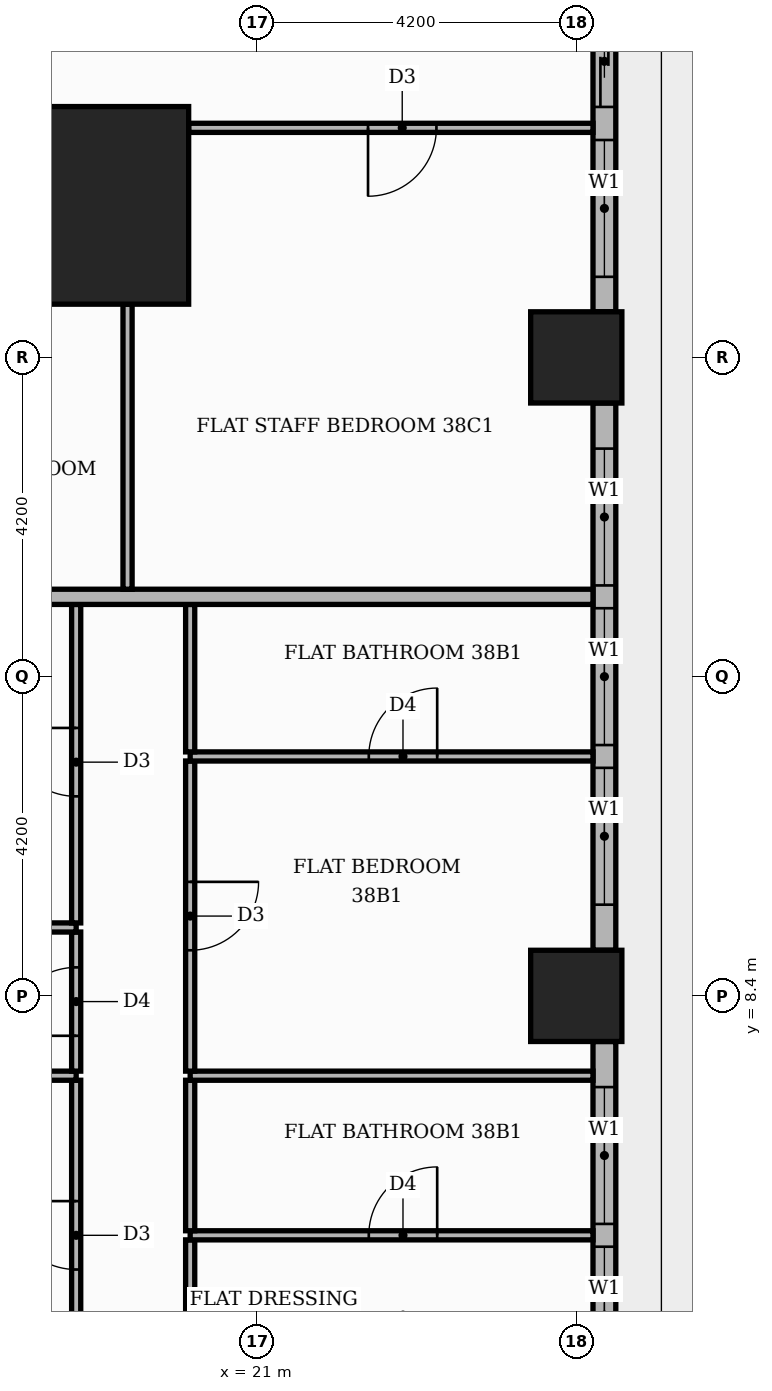
"""IFC4 building model, lengths in metres.
Left out: names, types, materials, properties, quantities, classifications, styles, units other than length and angle.
Written with IfcOpenShell. Run it as: python <this file> out.ifc"""

import sys

from ifc_helpers import new_model, si_unit, direction, frame, frame_2d, origin, origin_2d, place, context, subcontext, project, spatial, rectangle, extrude, element, fill, save


model = new_model("IFC4")
c1 = context("Model", 3, precision=1e-05, world=origin(), true_north=direction((0.0, 1.0)))
c2 = subcontext(c1, "Body", "Model", "MODEL_VIEW")
j1 = project(units=[si_unit("LENGTHUNIT", "METRE"), si_unit("PLANEANGLEUNIT", "RADIAN")], contexts=[c1])
p1 = place(None, origin())
s1 = spatial("IfcSite", under=j1, at=p1, CompositionType="ELEMENT")
p2 = place(p1, origin())
s2 = spatial("IfcBuilding", under=s1, at=p2, CompositionType="ELEMENT")
p3 = place(p2, frame((0.0, 0.0, 161.1)))
s3 = spatial("IfcBuildingStorey", under=s2, at=p3, CompositionType="ELEMENT", Elevation=161.1)
p4 = place(p3, frame((18.8, 18.8, 0.0), z_axis=(0.0, 0.0, 1.0), x_axis=(1.0, 0.0, 0.0)))
e1 = element("IfcColumn", 1, at=p4, inside=s3, PredefinedType="COLUMN", context=c2, shape_type="SweptSolid", body=[
    extrude(rectangle(XDim=2.6, YDim=2.6, at=origin_2d()), origin(), (0.0, 0.0, 1.0), 3.9),
])
for number, where, z_axis, x_axis in (
    (2, (25.2, 8.4, 0.0), (0.0, 0.0, 1.0), (1.0, 0.0, 0.0)),
    (3, (25.2, 16.8, 0.0), (0.0, 0.0, 1.0), (1.0, 0.0, 0.0)),
):
    element("IfcColumn", number, at=place(p3, frame(where, z_axis=z_axis, x_axis=x_axis)), inside=s3, PredefinedType="COLUMN", context=c2, shape_type="SweptSolid", body=[
        extrude(rectangle(XDim=1.2, YDim=1.2, at=origin_2d()), origin(), (0.0, 0.0, 1.0), 3.9),
    ])
p5 = place(p3, frame((25.57, 0.6, 0.0), z_axis=(0.0, 0.0, 1.0), x_axis=(0.0, 1.0, 0.0)))
e4 = element("IfcWall", 4, at=p5, inside=s3, PredefinedType="STANDARD", context=c2, shape_type="SweptSolid", body=[
    extrude(rectangle(XDim=7.2, YDim=0.3, at=frame_2d((3.6, 0.0))), origin(), (0.0, 0.0, 1.0), 3.48),
])
p6 = place(p5, frame((0.6, 0.0, 0.0)))
e5 = element("IfcOpeningElement", 5, at=p6, cuts=e4, PredefinedType="OPENING", context=c2, shape_type="SweptSolid", body=[
    extrude(rectangle(XDim=1.8, YDim=2.4, at=frame_2d((0.9, 1.2))), frame((0.0, 0.16, 0.0), z_axis=(0.0, -1.0, 0.0), x_axis=(1.0, 0.0, 0.0)), (0.0, 0.0, 1.0), 0.32),
])
p7 = place(p5, frame((2.7, 0.0, 0.9)))
e6 = element("IfcOpeningElement", 6, at=p7, cuts=e4, PredefinedType="OPENING", context=c2, shape_type="SweptSolid", body=[
    extrude(rectangle(XDim=1.8, YDim=2.1, at=frame_2d((0.9, 1.05))), frame((0.0, 0.16, 0.0), z_axis=(0.0, -1.0, 0.0), x_axis=(1.0, 0.0, 0.0)), (0.0, 0.0, 1.0), 0.32),
])
p8 = place(p5, frame((4.8, 0.0, 0.9)))
e7 = element("IfcOpeningElement", 7, at=p8, cuts=e4, PredefinedType="OPENING", context=c2, shape_type="SweptSolid", body=[
    extrude(rectangle(XDim=1.8, YDim=2.1, at=frame_2d((0.9, 1.05))), frame((0.0, 0.16, 0.0), z_axis=(0.0, -1.0, 0.0), x_axis=(1.0, 0.0, 0.0)), (0.0, 0.0, 1.0), 0.32),
])
p9 = place(p3, frame((25.57, 9.0, 0.0), z_axis=(0.0, 0.0, 1.0), x_axis=(0.0, 1.0, 0.0)))
e8 = element("IfcWall", 8, at=p9, inside=s3, PredefinedType="STANDARD", context=c2, shape_type="SweptSolid", body=[
    extrude(rectangle(XDim=7.2, YDim=0.3, at=frame_2d((3.6, 0.0))), origin(), (0.0, 0.0, 1.0), 3.48),
])
p10 = place(p9, frame((0.6, 0.0, 0.9)))
e9 = element("IfcOpeningElement", 9, at=p10, cuts=e8, PredefinedType="OPENING", context=c2, shape_type="SweptSolid", body=[
    extrude(rectangle(XDim=1.8, YDim=2.1, at=frame_2d((0.9, 1.05))), frame((0.0, 0.16, 0.0), z_axis=(0.0, -1.0, 0.0), x_axis=(1.0, 0.0, 0.0)), (0.0, 0.0, 1.0), 0.32),
])
p11 = place(p9, frame((2.7, 0.0, 0.9)))
e10 = element("IfcOpeningElement", 10, at=p11, cuts=e8, PredefinedType="OPENING", context=c2, shape_type="SweptSolid", body=[
    extrude(rectangle(XDim=1.8, YDim=2.1, at=frame_2d((0.9, 1.05))), frame((0.0, 0.16, 0.0), z_axis=(0.0, -1.0, 0.0), x_axis=(1.0, 0.0, 0.0)), (0.0, 0.0, 1.0), 0.32),
])
p12 = place(p9, frame((4.8, 0.0, 0.9)))
e11 = element("IfcOpeningElement", 11, at=p12, cuts=e8, PredefinedType="OPENING", context=c2, shape_type="SweptSolid", body=[
    extrude(rectangle(XDim=1.8, YDim=2.1, at=frame_2d((0.9, 1.05))), frame((0.0, 0.16, 0.0), z_axis=(0.0, -1.0, 0.0), x_axis=(1.0, 0.0, 0.0)), (0.0, 0.0, 1.0), 0.32),
])
p13 = place(p3, frame((25.57, 17.4, 0.0), z_axis=(0.0, 0.0, 1.0), x_axis=(0.0, 1.0, 0.0)))
e12 = element("IfcWall", 12, at=p13, inside=s3, PredefinedType="STANDARD", context=c2, shape_type="SweptSolid", body=[
    extrude(rectangle(XDim=4.32, YDim=0.3, at=frame_2d((2.16, 0.0))), origin(), (0.0, 0.0, 1.0), 3.48),
])
p14 = place(p13, frame((2.695, 0.0, 0.0)))
e13 = element("IfcOpeningElement", 13, at=p14, cuts=e12, PredefinedType="OPENING", context=c2, shape_type="SweptSolid", body=[
    extrude(rectangle(XDim=1.2, YDim=2.4, at=frame_2d((0.6, 1.2))), frame((0.0, 0.16, 0.0), z_axis=(0.0, -1.0, 0.0), x_axis=(1.0, 0.0, 0.0)), (0.0, 0.0, 1.0), 0.32),
])
p15 = place(p13, frame((0.46, 0.0, 0.9)))
e14 = element("IfcOpeningElement", 14, at=p15, cuts=e12, PredefinedType="OPENING", context=c2, shape_type="SweptSolid", body=[
    extrude(rectangle(XDim=1.8, YDim=2.1, at=frame_2d((0.9, 1.05))), frame((0.0, 0.16, 0.0), z_axis=(0.0, -1.0, 0.0), x_axis=(1.0, 0.0, 0.0)), (0.0, 0.0, 1.0), 0.32),
])
p16 = place(p3, frame((18.62, 3.21, 0.0), z_axis=(0.0, 0.0, 1.0), x_axis=(0.0, 1.0, 0.0)))
e15 = element("IfcWall", 15, at=p16, inside=s3, PredefinedType="PARTITIONING", context=c2, shape_type="SweptSolid", body=[
    extrude(rectangle(XDim=4.08, YDim=0.12, at=frame_2d((2.04, 0.0))), origin(), (0.0, 0.0, 1.0), 3.48),
])
p17 = place(p16, frame((1.59, 0.0, 0.0)))
e16 = element("IfcOpeningElement", 16, at=p17, cuts=e15, PredefinedType="OPENING", context=c2, shape_type="SweptSolid", body=[
    extrude(rectangle(XDim=0.9, YDim=2.1, at=frame_2d((0.45, 1.05))), frame((0.0, 0.07, 0.0), z_axis=(0.0, -1.0, 0.0), x_axis=(1.0, 0.0, 0.0)), (0.0, 0.0, 1.0), 0.14),
])
p18 = place(p3, frame((20.12, 3.21, 0.0), z_axis=(0.0, 0.0, 1.0), x_axis=(0.0, 1.0, 0.0)))
e17 = element("IfcWall", 17, at=p18, inside=s3, PredefinedType="PARTITIONING", context=c2, shape_type="SweptSolid", body=[
    extrude(rectangle(XDim=1.98, YDim=0.12, at=frame_2d((0.99, 0.0))), origin(), (0.0, 0.0, 1.0), 3.48),
])
p19 = place(p3, frame((20.12, 5.25, 0.0), z_axis=(0.0, 0.0, 1.0), x_axis=(1.0, 0.0, 0.0)))
e18 = element("IfcWall", 18, at=p19, inside=s3, PredefinedType="PARTITIONING", context=c2, shape_type="SweptSolid", body=[
    extrude(rectangle(XDim=5.3, YDim=0.12, at=frame_2d((2.65, 0.0))), origin(), (0.0, 0.0, 1.0), 3.48),
])
p20 = place(p19, frame((2.35, 0.0, 0.0)))
e19 = element("IfcOpeningElement", 19, at=p20, cuts=e18, PredefinedType="OPENING", context=c2, shape_type="SweptSolid", body=[
    extrude(rectangle(XDim=0.9, YDim=2.1, at=frame_2d((0.45, 1.05))), frame((0.0, 0.07, 0.0), z_axis=(0.0, -1.0, 0.0), x_axis=(1.0, 0.0, 0.0)), (0.0, 0.0, 1.0), 0.14),
])
p21 = place(p3, frame((20.12, 5.31, 0.0), z_axis=(0.0, 0.0, 1.0), x_axis=(0.0, 1.0, 0.0)))
e20 = element("IfcWall", 20, at=p21, inside=s3, PredefinedType="PARTITIONING", context=c2, shape_type="SweptSolid", body=[
    extrude(rectangle(XDim=1.98, YDim=0.12, at=frame_2d((0.99, 0.0))), origin(), (0.0, 0.0, 1.0), 3.48),
])
p22 = place(p3, frame((11.0, 7.35, 0.0), z_axis=(0.0, 0.0, 1.0), x_axis=(1.0, 0.0, 0.0)))
e21 = element("IfcWall", 21, at=p22, inside=s3, PredefinedType="PARTITIONING", context=c2, shape_type="SweptSolid", body=[
    extrude(rectangle(XDim=7.62, YDim=0.12, at=frame_2d((3.81, 0.0))), origin(), (0.0, 0.0, 1.0), 3.48),
])
p23 = place(p3, frame((20.12, 7.35, 0.0), z_axis=(0.0, 0.0, 1.0), x_axis=(1.0, 0.0, 0.0)))
e22 = element("IfcWall", 22, at=p23, inside=s3, PredefinedType="PARTITIONING", context=c2, shape_type="SweptSolid", body=[
    extrude(rectangle(XDim=5.3, YDim=0.12, at=frame_2d((2.65, 0.0))), origin(), (0.0, 0.0, 1.0), 3.48),
])
p24 = place(p3, frame((18.62, 7.41, 0.0), z_axis=(0.0, 0.0, 1.0), x_axis=(0.0, 1.0, 0.0)))
e23 = element("IfcWall", 23, at=p24, inside=s3, PredefinedType="PARTITIONING", context=c2, shape_type="SweptSolid", body=[
    extrude(rectangle(XDim=1.83, YDim=0.12, at=frame_2d((0.915, 0.0))), origin(), (0.0, 0.0, 1.0), 3.48),
])
p25 = place(p24, frame((0.465, 0.0, 0.0)))
e24 = element("IfcOpeningElement", 24, at=p25, cuts=e23, PredefinedType="OPENING", context=c2, shape_type="SweptSolid", body=[
    extrude(rectangle(XDim=0.9, YDim=2.1, at=frame_2d((0.45, 1.05))), frame((0.0, 0.07, 0.0), z_axis=(0.0, -1.0, 0.0), x_axis=(1.0, 0.0, 0.0)), (0.0, 0.0, 1.0), 0.14),
])
p26 = place(p3, frame((20.12, 7.41, 0.0), z_axis=(0.0, 0.0, 1.0), x_axis=(0.0, 1.0, 0.0)))
e25 = element("IfcWall", 25, at=p26, inside=s3, PredefinedType="PARTITIONING", context=c2, shape_type="SweptSolid", body=[
    extrude(rectangle(XDim=4.08, YDim=0.12, at=frame_2d((2.04, 0.0))), origin(), (0.0, 0.0, 1.0), 3.48),
])
p27 = place(p26, frame((1.59, 0.0, 0.0)))
e26 = element("IfcOpeningElement", 26, at=p27, cuts=e25, PredefinedType="OPENING", context=c2, shape_type="SweptSolid", body=[
    extrude(rectangle(XDim=0.9, YDim=2.1, at=frame_2d((0.45, 1.05))), frame((0.0, 0.07, 0.0), z_axis=(0.0, -1.0, 0.0), x_axis=(1.0, 0.0, 0.0)), (0.0, 0.0, 1.0), 0.14),
])
p28 = place(p3, frame((11.0, 9.3, 0.0), z_axis=(0.0, 0.0, 1.0), x_axis=(1.0, 0.0, 0.0)))
e27 = element("IfcWall", 27, at=p28, inside=s3, PredefinedType="PARTITIONING", context=c2, shape_type="SweptSolid", body=[
    extrude(rectangle(XDim=7.62, YDim=0.12, at=frame_2d((3.81, 0.0))), origin(), (0.0, 0.0, 1.0), 3.48),
])
p29 = place(p3, frame((18.62, 9.36, 0.0), z_axis=(0.0, 0.0, 1.0), x_axis=(0.0, 1.0, 0.0)))
e28 = element("IfcWall", 28, at=p29, inside=s3, PredefinedType="PARTITIONING", context=c2, shape_type="SweptSolid", body=[
    extrude(rectangle(XDim=4.19, YDim=0.12, at=frame_2d((2.095, 0.0))), origin(), (0.0, 0.0, 1.0), 3.48),
])
p30 = place(p29, frame((1.665, 0.0, 0.0)))
e29 = element("IfcOpeningElement", 29, at=p30, cuts=e28, PredefinedType="OPENING", context=c2, shape_type="SweptSolid", body=[
    extrude(rectangle(XDim=0.9, YDim=2.1, at=frame_2d((0.45, 1.05))), frame((0.0, 0.07, 0.0), z_axis=(0.0, -1.0, 0.0), x_axis=(1.0, 0.0, 0.0)), (0.0, 0.0, 1.0), 0.14),
])
p31 = place(p3, frame((20.12, 11.55, 0.0), z_axis=(0.0, 0.0, 1.0), x_axis=(1.0, 0.0, 0.0)))
e30 = element("IfcWall", 30, at=p31, inside=s3, PredefinedType="PARTITIONING", context=c2, shape_type="SweptSolid", body=[
    extrude(rectangle(XDim=5.3, YDim=0.12, at=frame_2d((2.65, 0.0))), origin(), (0.0, 0.0, 1.0), 3.48),
])
p32 = place(p31, frame((2.35, 0.0, 0.0)))
e31 = element("IfcOpeningElement", 31, at=p32, cuts=e30, PredefinedType="OPENING", context=c2, shape_type="SweptSolid", body=[
    extrude(rectangle(XDim=0.9, YDim=2.1, at=frame_2d((0.45, 1.05))), frame((0.0, 0.07, 0.0), z_axis=(0.0, -1.0, 0.0), x_axis=(1.0, 0.0, 0.0)), (0.0, 0.0, 1.0), 0.14),
])
p33 = place(p3, frame((20.12, 11.61, 0.0), z_axis=(0.0, 0.0, 1.0), x_axis=(0.0, 1.0, 0.0)))
e32 = element("IfcWall", 32, at=p33, inside=s3, PredefinedType="PARTITIONING", context=c2, shape_type="SweptSolid", body=[
    extrude(rectangle(XDim=1.94, YDim=0.12, at=frame_2d((0.97, 0.0))), origin(), (0.0, 0.0, 1.0), 3.48),
])
p34 = place(p3, frame((-13.65, 13.65, 0.0), z_axis=(0.0, 0.0, 1.0), x_axis=(1.0, 0.0, 0.0)))
e33 = element("IfcWall", 33, at=p34, inside=s3, PredefinedType="PARTITIONING", context=c2, shape_type="SweptSolid", body=[
    extrude(rectangle(XDim=39.07, YDim=0.2, at=frame_2d((19.535, 0.0))), origin(), (0.0, 0.0, 1.0), 3.48),
])
p35 = place(p34, frame((24.65, 0.0, 0.0)))
e34 = element("IfcOpeningElement", 34, at=p35, cuts=e33, PredefinedType="OPENING", context=c2, shape_type="SweptSolid", body=[
    extrude(rectangle(XDim=1.1, YDim=2.4, at=frame_2d((0.55, 1.2))), frame((0.0, 0.11, 0.0), z_axis=(0.0, -1.0, 0.0), x_axis=(1.0, 0.0, 0.0)), (0.0, 0.0, 1.0), 0.22),
])
p36 = place(p34, frame((12.05, 0.0, 0.0)))
e35 = element("IfcOpeningElement", 35, at=p36, cuts=e33, PredefinedType="OPENING", context=c2, shape_type="SweptSolid", body=[
    extrude(rectangle(XDim=1.1, YDim=2.4, at=frame_2d((0.55, 1.2))), frame((0.0, 0.11, 0.0), z_axis=(0.0, -1.0, 0.0), x_axis=(1.0, 0.0, 0.0)), (0.0, 0.0, 1.0), 0.22),
])
p37 = place(p3, frame((19.296, 13.75, 0.0), z_axis=(0.0, 0.0, 1.0), x_axis=(0.0, 1.0, 0.0)))
e36 = element("IfcWall", 36, at=p37, inside=s3, PredefinedType="PARTITIONING", context=c2, shape_type="SweptSolid", body=[
    extrude(rectangle(XDim=3.75, YDim=0.12, at=frame_2d((1.875, 0.0))), origin(), (0.0, 0.0, 1.0), 3.48),
])
p38 = place(p3, frame((20.1, 19.82, 0.0), z_axis=(0.0, 0.0, 1.0), x_axis=(1.0, 0.0, 0.0)))
e37 = element("IfcWall", 37, at=p38, inside=s3, PredefinedType="PARTITIONING", context=c2, shape_type="SweptSolid", body=[
    extrude(rectangle(XDim=5.32, YDim=0.12, at=frame_2d((2.66, 0.0))), origin(), (0.0, 0.0, 1.0), 3.48),
])
p39 = place(p38, frame((2.36, 0.0, 0.0)))
e38 = element("IfcOpeningElement", 38, at=p39, cuts=e37, PredefinedType="OPENING", context=c2, shape_type="SweptSolid", body=[
    extrude(rectangle(XDim=0.9, YDim=2.1, at=frame_2d((0.45, 1.05))), frame((0.0, 0.07, 0.0), z_axis=(0.0, -1.0, 0.0), x_axis=(1.0, 0.0, 0.0)), (0.0, 0.0, 1.0), 0.14),
])
p40 = place(p7, origin())
e39 = element("IfcWindow", 39, at=p40, inside=s3, PartitioningType="SINGLE_PANEL", PredefinedType="WINDOW", context=c2, shape_type="SweptSolid", body=[
    extrude(rectangle(XDim=1.8, YDim=2.1, at=frame_2d((0.9, 1.05))), frame((0.0, 0.03, 0.0), z_axis=(0.0, -1.0, 0.0), x_axis=(1.0, 0.0, 0.0)), (0.0, 0.0, 1.0), 0.06),
])
fill(e6, e39)
p41 = place(p8, origin())
e40 = element("IfcWindow", 40, at=p41, inside=s3, PartitioningType="SINGLE_PANEL", PredefinedType="WINDOW", context=c2, shape_type="SweptSolid", body=[
    extrude(rectangle(XDim=1.8, YDim=2.1, at=frame_2d((0.9, 1.05))), frame((0.0, 0.03, 0.0), z_axis=(0.0, -1.0, 0.0), x_axis=(1.0, 0.0, 0.0)), (0.0, 0.0, 1.0), 0.06),
])
fill(e7, e40)
p42 = place(p10, origin())
e41 = element("IfcWindow", 41, at=p42, inside=s3, PartitioningType="SINGLE_PANEL", PredefinedType="WINDOW", context=c2, shape_type="SweptSolid", body=[
    extrude(rectangle(XDim=1.8, YDim=2.1, at=frame_2d((0.9, 1.05))), frame((0.0, 0.03, 0.0), z_axis=(0.0, -1.0, 0.0), x_axis=(1.0, 0.0, 0.0)), (0.0, 0.0, 1.0), 0.06),
])
fill(e9, e41)
p43 = place(p11, origin())
e42 = element("IfcWindow", 42, at=p43, inside=s3, PartitioningType="SINGLE_PANEL", PredefinedType="WINDOW", context=c2, shape_type="SweptSolid", body=[
    extrude(rectangle(XDim=1.8, YDim=2.1, at=frame_2d((0.9, 1.05))), frame((0.0, 0.03, 0.0), z_axis=(0.0, -1.0, 0.0), x_axis=(1.0, 0.0, 0.0)), (0.0, 0.0, 1.0), 0.06),
])
fill(e10, e42)
p44 = place(p12, origin())
e43 = element("IfcWindow", 43, at=p44, inside=s3, PartitioningType="SINGLE_PANEL", PredefinedType="WINDOW", context=c2, shape_type="SweptSolid", body=[
    extrude(rectangle(XDim=1.8, YDim=2.1, at=frame_2d((0.9, 1.05))), frame((0.0, 0.03, 0.0), z_axis=(0.0, -1.0, 0.0), x_axis=(1.0, 0.0, 0.0)), (0.0, 0.0, 1.0), 0.06),
])
fill(e11, e43)
p45 = place(p14, origin())
e44 = element("IfcDoor", 44, at=p45, inside=s3, OperationType="SLIDING_TO_LEFT", PredefinedType="DOOR", context=c2, shape_type="SweptSolid", body=[
    extrude(rectangle(XDim=1.2, YDim=2.4, at=frame_2d((0.6, 1.2))), frame((0.0, 0.025, 0.0), z_axis=(0.0, -1.0, 0.0), x_axis=(1.0, 0.0, 0.0)), (0.0, 0.0, 1.0), 0.05),
])
fill(e13, e44)
p46 = place(p15, origin())
e45 = element("IfcWindow", 45, at=p46, inside=s3, PartitioningType="SINGLE_PANEL", PredefinedType="WINDOW", context=c2, shape_type="SweptSolid", body=[
    extrude(rectangle(XDim=1.8, YDim=2.1, at=frame_2d((0.9, 1.05))), frame((0.0, 0.03, 0.0), z_axis=(0.0, -1.0, 0.0), x_axis=(1.0, 0.0, 0.0)), (0.0, 0.0, 1.0), 0.06),
])
fill(e14, e45)
p47 = place(p17, origin())
e46 = element("IfcDoor", 46, at=p47, inside=s3, OperationType="SINGLE_SWING_RIGHT", PredefinedType="DOOR", context=c2, shape_type="SweptSolid", body=[
    extrude(rectangle(XDim=0.9, YDim=2.1, at=frame_2d((0.45, 1.05))), frame((0.0, 0.025, 0.0), z_axis=(0.0, -1.0, 0.0), x_axis=(1.0, 0.0, 0.0)), (0.0, 0.0, 1.0), 0.05),
])
fill(e16, e46)
p48 = place(p25, origin())
e47 = element("IfcDoor", 47, at=p48, inside=s3, OperationType="SINGLE_SWING_LEFT", PredefinedType="DOOR", context=c2, shape_type="SweptSolid", body=[
    extrude(rectangle(XDim=0.9, YDim=2.1, at=frame_2d((0.45, 1.05))), frame((0.0, 0.025, 0.0), z_axis=(0.0, -1.0, 0.0), x_axis=(1.0, 0.0, 0.0)), (0.0, 0.0, 1.0), 0.05),
])
fill(e24, e47)
p49 = place(p30, origin())
e48 = element("IfcDoor", 48, at=p49, inside=s3, OperationType="SINGLE_SWING_RIGHT", PredefinedType="DOOR", context=c2, shape_type="SweptSolid", body=[
    extrude(rectangle(XDim=0.9, YDim=2.1, at=frame_2d((0.45, 1.05))), frame((0.0, 0.025, 0.0), z_axis=(0.0, -1.0, 0.0), x_axis=(1.0, 0.0, 0.0)), (0.0, 0.0, 1.0), 0.05),
])
fill(e29, e48)
p50 = place(p20, origin())
e49 = element("IfcDoor", 49, at=p50, inside=s3, OperationType="SINGLE_SWING_RIGHT", PredefinedType="DOOR", context=c2, shape_type="SweptSolid", body=[
    extrude(rectangle(XDim=0.9, YDim=2.1, at=frame_2d((0.45, 1.05))), frame((0.0, 0.025, 0.0), z_axis=(0.0, -1.0, 0.0), x_axis=(1.0, 0.0, 0.0)), (0.0, 0.0, 1.0), 0.05),
])
fill(e19, e49)
p51 = place(p27, frame((0.9, 0.0, 0.0), z_axis=(0.0, 0.0, 1.0), x_axis=(-1.0, 0.0, 0.0)))
e50 = element("IfcDoor", 50, at=p51, inside=s3, OperationType="SINGLE_SWING_RIGHT", PredefinedType="DOOR", context=c2, shape_type="SweptSolid", body=[
    extrude(rectangle(XDim=0.9, YDim=2.1, at=frame_2d((0.45, 1.05))), frame((0.0, 0.025, 0.0), z_axis=(0.0, -1.0, 0.0), x_axis=(1.0, 0.0, 0.0)), (0.0, 0.0, 1.0), 0.05),
])
fill(e26, e50)
p52 = place(p32, origin())
e51 = element("IfcDoor", 51, at=p52, inside=s3, OperationType="SINGLE_SWING_RIGHT", PredefinedType="DOOR", context=c2, shape_type="SweptSolid", body=[
    extrude(rectangle(XDim=0.9, YDim=2.1, at=frame_2d((0.45, 1.05))), frame((0.0, 0.025, 0.0), z_axis=(0.0, -1.0, 0.0), x_axis=(1.0, 0.0, 0.0)), (0.0, 0.0, 1.0), 0.05),
])
fill(e31, e51)
p53 = place(p39, frame((0.9, 0.0, 0.0), z_axis=(0.0, 0.0, 1.0), x_axis=(-1.0, 0.0, 0.0)))
e52 = element("IfcDoor", 52, at=p53, inside=s3, OperationType="SINGLE_SWING_LEFT", PredefinedType="DOOR", context=c2, shape_type="SweptSolid", body=[
    extrude(rectangle(XDim=0.9, YDim=2.1, at=frame_2d((0.45, 1.05))), frame((0.0, 0.025, 0.0), z_axis=(0.0, -1.0, 0.0), x_axis=(1.0, 0.0, 0.0)), (0.0, 0.0, 1.0), 0.05),
])
fill(e38, e52)
save(model, sys.argv[1])
